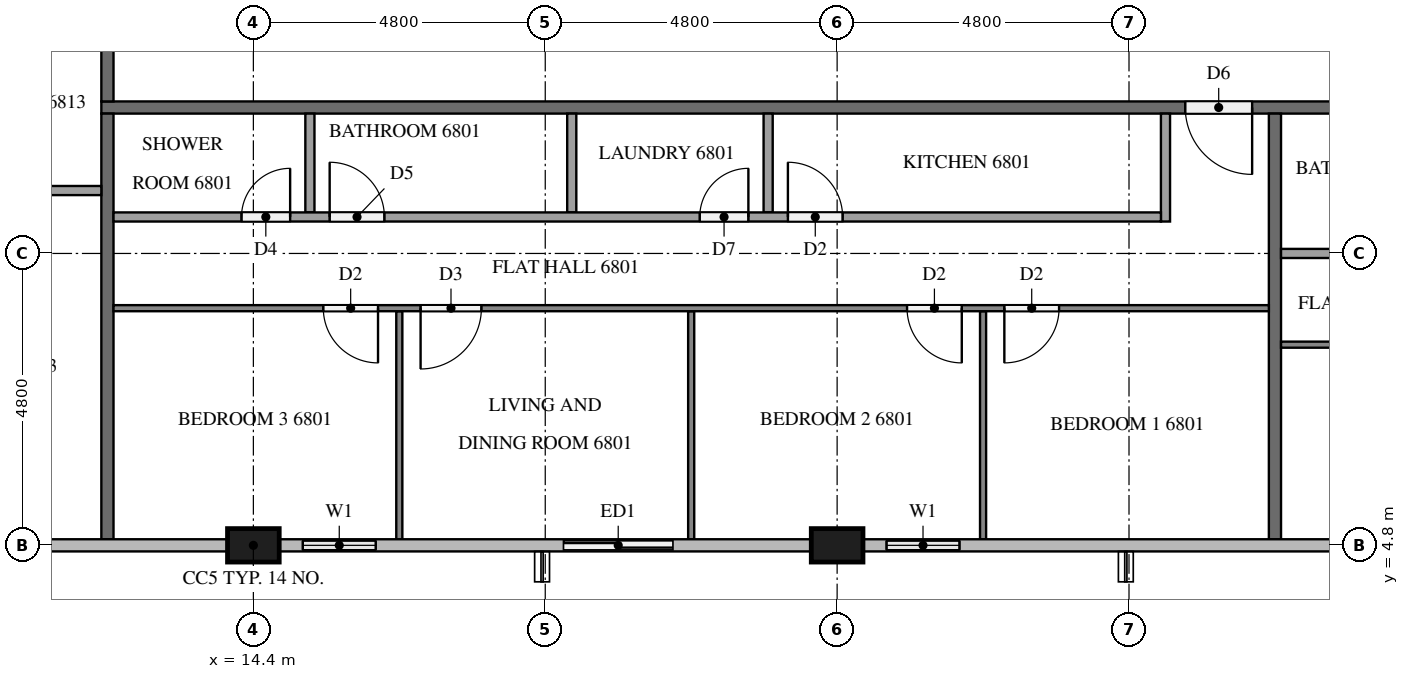
"""IFC4 building model, lengths in metres.
Left out: names, types, materials, properties, quantities, classifications, styles, units other than length and angle.
Written with IfcOpenShell. Run it as: python <this file> out.ifc"""

import sys

from ifc_helpers import new_model, si_unit, direction, frame, frame_2d, origin, origin_2d, place, context, subcontext, project, spatial, rectangle, extrude, element, fill, save


model = new_model("IFC4")
c1 = context("Model", 3, precision=1e-05, world=origin(), true_north=direction((0.0, 1.0)))
c2 = subcontext(c1, "Body", "Model", "MODEL_VIEW")
j1 = project(units=[si_unit("LENGTHUNIT", "METRE"), si_unit("PLANEANGLEUNIT", "RADIAN")], contexts=[c1])
p1 = place(None, origin())
s1 = spatial("IfcSite", under=j1, at=p1, CompositionType="ELEMENT")
p2 = place(p1, origin())
s2 = spatial("IfcBuilding", under=s1, at=p2, CompositionType="ELEMENT")
p3 = place(p2, frame((0.0, 0.0, 259.7)))
s3 = spatial("IfcBuildingStorey", under=s2, at=p3, CompositionType="ELEMENT", Elevation=259.7)
for number, where, z_axis, x_axis in (
    (1, (14.4, 4.8, 0.0), (0.0, 0.0, 1.0), (1.0, 0.0, 0.0)),
    (2, (24.0, 4.8, 0.0), (0.0, 0.0, 1.0), (1.0, 0.0, 0.0)),
):
    element("IfcColumn", number, at=place(p3, frame(where, z_axis=z_axis, x_axis=x_axis)), inside=s3, PredefinedType="COLUMN", context=c2, shape_type="SweptSolid", body=[
        extrude(rectangle(XDim=0.85, YDim=0.55, at=origin_2d()), origin(), (0.0, 0.0, 1.0), 3.1),
    ])
p4 = place(p3, frame((14.825, 4.8, 0.0), z_axis=(0.0, 0.0, 1.0), x_axis=(1.0, 0.0, 0.0)))
e3 = element("IfcWall", 3, at=p4, inside=s3, PredefinedType="SOLIDWALL", context=c2, shape_type="SweptSolid", body=[
    extrude(rectangle(XDim=1.975, YDim=0.15, at=frame_2d((0.988, 0.0))), origin(), (0.0, 0.0, 1.0), 3.1),
])
p5 = place(p4, frame((0.387, 0.0, 0.9)))
e4 = element("IfcOpeningElement", 4, at=p5, cuts=e3, PredefinedType="OPENING", context=c2, shape_type="SweptSolid", body=[
    extrude(rectangle(XDim=1.2, YDim=1.4, at=frame_2d((0.6, 0.7))), frame((0.0, 0.085, 0.0), z_axis=(0.0, -1.0, 0.0), x_axis=(1.0, 0.0, 0.0)), (0.0, 0.0, 1.0), 0.17),
])
p6 = place(p3, frame((19.2, 4.8, 0.0), z_axis=(0.0, 0.0, 1.0), x_axis=(1.0, 0.0, 0.0)))
e5 = element("IfcWall", 5, at=p6, inside=s3, PredefinedType="SOLIDWALL", context=c2, shape_type="SweptSolid", body=[
    extrude(rectangle(XDim=2.4, YDim=0.15, at=frame_2d((1.2, 0.0))), origin(), (0.0, 0.0, 1.0), 3.1),
])
p7 = place(p6, frame((0.3, 0.0, 0.0)))
e6 = element("IfcOpeningElement", 6, at=p7, cuts=e5, PredefinedType="OPENING", context=c2, shape_type="SweptSolid", body=[
    extrude(rectangle(XDim=1.8, YDim=2.4, at=frame_2d((0.9, 1.2))), frame((0.0, 0.085, 0.0), z_axis=(0.0, -1.0, 0.0), x_axis=(1.0, 0.0, 0.0)), (0.0, 0.0, 1.0), 0.17),
])
p8 = place(p3, frame((24.425, 4.8, 0.0), z_axis=(0.0, 0.0, 1.0), x_axis=(1.0, 0.0, 0.0)))
e7 = element("IfcWall", 7, at=p8, inside=s3, PredefinedType="SOLIDWALL", context=c2, shape_type="SweptSolid", body=[
    extrude(rectangle(XDim=1.975, YDim=0.15, at=frame_2d((0.987, 0.0))), origin(), (0.0, 0.0, 1.0), 3.1),
])
p9 = place(p8, frame((0.387, 0.0, 0.9)))
e8 = element("IfcOpeningElement", 8, at=p9, cuts=e7, PredefinedType="OPENING", context=c2, shape_type="SweptSolid", body=[
    extrude(rectangle(XDim=1.2, YDim=1.4, at=frame_2d((0.6, 0.7))), frame((0.0, 0.085, 0.0), z_axis=(0.0, -1.0, 0.0), x_axis=(1.0, 0.0, 0.0)), (0.0, 0.0, 1.0), 0.17),
])
p10 = place(p3, frame((50.5, 12.0, 0.0), z_axis=(0.0, 0.0, 1.0), x_axis=(-1.0, 0.0, 0.0)))
e9 = element("IfcWall", 9, at=p10, inside=s3, PredefinedType="PARTITIONING", context=c2, shape_type="SweptSolid", body=[
    extrude(rectangle(XDim=38.6, YDim=0.2, at=frame_2d((19.3, 0.0))), origin(), (0.0, 0.0, 1.0), 3.1),
])
p11 = place(p10, frame((19.675, 0.0, 0.0)))
e10 = element("IfcOpeningElement", 10, at=p11, cuts=e9, PredefinedType="OPENING", context=c2, shape_type="SweptSolid", body=[
    extrude(rectangle(XDim=1.1, YDim=2.1, at=frame_2d((0.55, 1.05))), frame((0.0, 0.11, 0.0), z_axis=(0.0, -1.0, 0.0), x_axis=(1.0, 0.0, 0.0)), (0.0, 0.0, 1.0), 0.22),
])
p12 = place(p10, frame((2.925, 0.0, 0.0)))
e11 = element("IfcOpeningElement", 11, at=p12, cuts=e9, PredefinedType="OPENING", context=c2, shape_type="SweptSolid", body=[
    extrude(rectangle(XDim=1.0, YDim=2.1, at=frame_2d((0.5, 1.05))), frame((0.0, 0.11, 0.0), z_axis=(0.0, -1.0, 0.0), x_axis=(1.0, 0.0, 0.0)), (0.0, 0.0, 1.0), 0.22),
])
p13 = place(p10, frame((1.075, 0.0, 0.0)))
e12 = element("IfcOpeningElement", 12, at=p13, cuts=e9, PredefinedType="OPENING", context=c2, shape_type="SweptSolid", body=[
    extrude(rectangle(XDim=1.0, YDim=2.1, at=frame_2d((0.5, 1.05))), frame((0.0, 0.11, 0.0), z_axis=(0.0, -1.0, 0.0), x_axis=(1.0, 0.0, 0.0)), (0.0, 0.0, 1.0), 0.22),
])
p14 = place(p3, frame((12.0, 12.1, 0.0), z_axis=(0.0, 0.0, 1.0), x_axis=(0.0, 1.0, 0.0)))
e13 = element("IfcWall", 13, at=p14, inside=s3, PredefinedType="PARTITIONING", context=c2, shape_type="SweptSolid", body=[
    extrude(rectangle(XDim=28.6, YDim=0.2, at=frame_2d((14.3, 0.0))), origin(), (0.0, 0.0, 1.0), 3.1),
])
p15 = place(p14, frame((21.875, 0.0, 0.0)))
e14 = element("IfcOpeningElement", 14, at=p15, cuts=e13, PredefinedType="OPENING", context=c2, shape_type="SweptSolid", body=[
    extrude(rectangle(XDim=1.1, YDim=2.1, at=frame_2d((0.55, 1.05))), frame((0.0, 0.11, 0.0), z_axis=(0.0, -1.0, 0.0), x_axis=(1.0, 0.0, 0.0)), (0.0, 0.0, 1.0), 0.22),
])
p16 = place(p14, frame((20.075, 0.0, 0.0)))
e15 = element("IfcOpeningElement", 15, at=p16, cuts=e13, PredefinedType="OPENING", context=c2, shape_type="SweptSolid", body=[
    extrude(rectangle(XDim=1.0, YDim=2.1, at=frame_2d((0.5, 1.05))), frame((0.0, 0.11, 0.0), z_axis=(0.0, -1.0, 0.0), x_axis=(1.0, 0.0, 0.0)), (0.0, 0.0, 1.0), 0.22),
])
p17 = place(p14, frame((5.675, 0.0, 0.0)))
e16 = element("IfcOpeningElement", 16, at=p17, cuts=e13, PredefinedType="OPENING", context=c2, shape_type="SweptSolid", body=[
    extrude(rectangle(XDim=1.0, YDim=2.1, at=frame_2d((0.5, 1.05))), frame((0.0, 0.11, 0.0), z_axis=(0.0, -1.0, 0.0), x_axis=(1.0, 0.0, 0.0)), (0.0, 0.0, 1.0), 0.22),
])
for number, where, z_axis, x_axis in (
    (17, (31.2, 11.9, 0.0), (0.0, 0.0, 1.0), (0.0, -1.0, 0.0)),
    (18, (12.0, 4.9, 0.0), (0.0, 0.0, 1.0), (0.0, 1.0, 0.0)),
):
    element("IfcWall", number, at=place(p3, frame(where, z_axis=z_axis, x_axis=x_axis)), inside=s3, PredefinedType="PARTITIONING", context=c2, shape_type="SweptSolid", body=[
        extrude(rectangle(XDim=7.0, YDim=0.2, at=frame_2d((3.5, 0.0))), origin(), (0.0, 0.0, 1.0), 3.1),
    ])
for number, where, z_axis, x_axis in (
    (19, (26.4, 8.65, 0.0), (0.0, 0.0, 1.0), (0.0, -1.0, 0.0)),
    (20, (21.6, 8.65, 0.0), (0.0, 0.0, 1.0), (0.0, -1.0, 0.0)),
    (21, (16.8, 8.65, 0.0), (0.0, 0.0, 1.0), (0.0, -1.0, 0.0)),
):
    element("IfcWall", number, at=place(p3, frame(where, z_axis=z_axis, x_axis=x_axis)), inside=s3, PredefinedType="PARTITIONING", context=c2, shape_type="SweptSolid", body=[
        extrude(rectangle(XDim=3.75, YDim=0.1, at=frame_2d((1.875, 0.0))), origin(), (0.0, 0.0, 1.0), 3.1),
    ])
p18 = place(p3, frame((31.1, 8.7, 0.0), z_axis=(0.0, 0.0, 1.0), x_axis=(-1.0, 0.0, 0.0)))
e22 = element("IfcWall", 22, at=p18, inside=s3, PredefinedType="PARTITIONING", context=c2, shape_type="SweptSolid", body=[
    extrude(rectangle(XDim=19.0, YDim=0.1, at=frame_2d((9.5, 0.0))), origin(), (0.0, 0.0, 1.0), 3.1),
])
p19 = place(p18, frame((3.45, 0.0, 0.0)))
e23 = element("IfcOpeningElement", 23, at=p19, cuts=e22, PredefinedType="OPENING", context=c2, shape_type="SweptSolid", body=[
    extrude(rectangle(XDim=0.9, YDim=2.1, at=frame_2d((0.45, 1.05))), frame((0.0, 0.06, 0.0), z_axis=(0.0, -1.0, 0.0), x_axis=(1.0, 0.0, 0.0)), (0.0, 0.0, 1.0), 0.12),
])
p20 = place(p18, frame((5.05, 0.0, 0.0)))
e24 = element("IfcOpeningElement", 24, at=p20, cuts=e22, PredefinedType="OPENING", context=c2, shape_type="SweptSolid", body=[
    extrude(rectangle(XDim=0.9, YDim=2.1, at=frame_2d((0.45, 1.05))), frame((0.0, 0.06, 0.0), z_axis=(0.0, -1.0, 0.0), x_axis=(1.0, 0.0, 0.0)), (0.0, 0.0, 1.0), 0.12),
])
p21 = place(p18, frame((12.95, 0.0, 0.0)))
e25 = element("IfcOpeningElement", 25, at=p21, cuts=e22, PredefinedType="OPENING", context=c2, shape_type="SweptSolid", body=[
    extrude(rectangle(XDim=1.0, YDim=2.1, at=frame_2d((0.5, 1.05))), frame((0.0, 0.06, 0.0), z_axis=(0.0, -1.0, 0.0), x_axis=(1.0, 0.0, 0.0)), (0.0, 0.0, 1.0), 0.12),
])
p22 = place(p18, frame((14.65, 0.0, 0.0)))
e26 = element("IfcOpeningElement", 26, at=p22, cuts=e22, PredefinedType="OPENING", context=c2, shape_type="SweptSolid", body=[
    extrude(rectangle(XDim=0.9, YDim=2.1, at=frame_2d((0.45, 1.05))), frame((0.0, 0.06, 0.0), z_axis=(0.0, -1.0, 0.0), x_axis=(1.0, 0.0, 0.0)), (0.0, 0.0, 1.0), 0.12),
])
for number, where, z_axis, x_axis in (
    (27, (22.865, 11.9, 0.0), (0.0, 0.0, 1.0), (0.0, -1.0, 0.0)),
    (28, (19.636, 11.9, 0.0), (0.0, 0.0, 1.0), (0.0, -1.0, 0.0)),
    (29, (15.33, 11.9, 0.0), (0.0, 0.0, 1.0), (0.0, -1.0, 0.0)),
):
    element("IfcWall", number, at=place(p3, frame(where, z_axis=z_axis, x_axis=x_axis)), inside=s3, PredefinedType="PARTITIONING", context=c2, shape_type="SweptSolid", body=[
        extrude(rectangle(XDim=1.625, YDim=0.15, at=frame_2d((0.812, 0.0))), origin(), (0.0, 0.0, 1.0), 3.1),
    ])
p23 = place(p3, frame((29.4, 11.9, 0.0), z_axis=(0.0, 0.0, 1.0), x_axis=(0.0, -1.0, 0.0)))
e30 = element("IfcWall", 30, at=p23, inside=s3, PredefinedType="PARTITIONING", context=c2, shape_type="SweptSolid", body=[
    extrude(rectangle(XDim=1.775, YDim=0.15, at=frame_2d((0.887, 0.0))), origin(), (0.0, 0.0, 1.0), 3.1),
])
p24 = place(p3, frame((12.1, 10.2, 0.0), z_axis=(0.0, 0.0, 1.0), x_axis=(1.0, 0.0, 0.0)))
e31 = element("IfcWall", 31, at=p24, inside=s3, PredefinedType="PARTITIONING", context=c2, shape_type="SweptSolid", body=[
    extrude(rectangle(XDim=17.225, YDim=0.15, at=frame_2d((8.612, 0.0))), origin(), (0.0, 0.0, 1.0), 3.1),
])
p25 = place(p24, frame((11.091, 0.0, 0.0)))
e32 = element("IfcOpeningElement", 32, at=p25, cuts=e31, PredefinedType="OPENING", context=c2, shape_type="SweptSolid", body=[
    extrude(rectangle(XDim=0.9, YDim=2.1, at=frame_2d((0.45, 1.05))), frame((0.0, 0.085, 0.0), z_axis=(0.0, -1.0, 0.0), x_axis=(1.0, 0.0, 0.0)), (0.0, 0.0, 1.0), 0.17),
])
p26 = place(p24, frame((9.641, 0.0, 0.0)))
e33 = element("IfcOpeningElement", 33, at=p26, cuts=e31, PredefinedType="OPENING", context=c2, shape_type="SweptSolid", body=[
    extrude(rectangle(XDim=0.8, YDim=2.1, at=frame_2d((0.4, 1.05))), frame((0.0, 0.085, 0.0), z_axis=(0.0, -1.0, 0.0), x_axis=(1.0, 0.0, 0.0)), (0.0, 0.0, 1.0), 0.17),
])
p27 = place(p24, frame((3.555, 0.0, 0.0)))
e34 = element("IfcOpeningElement", 34, at=p27, cuts=e31, PredefinedType="OPENING", context=c2, shape_type="SweptSolid", body=[
    extrude(rectangle(XDim=0.9, YDim=2.1, at=frame_2d((0.45, 1.05))), frame((0.0, 0.085, 0.0), z_axis=(0.0, -1.0, 0.0), x_axis=(1.0, 0.0, 0.0)), (0.0, 0.0, 1.0), 0.17),
])
p28 = place(p24, frame((2.105, 0.0, 0.0)))
e35 = element("IfcOpeningElement", 35, at=p28, cuts=e31, PredefinedType="OPENING", context=c2, shape_type="SweptSolid", body=[
    extrude(rectangle(XDim=0.8, YDim=2.1, at=frame_2d((0.4, 1.05))), frame((0.0, 0.085, 0.0), z_axis=(0.0, -1.0, 0.0), x_axis=(1.0, 0.0, 0.0)), (0.0, 0.0, 1.0), 0.17),
])
p29 = place(p3, frame((47.9, 8.1, 0.0), z_axis=(0.0, 0.0, 1.0), x_axis=(-1.0, 0.0, 0.0)))
e36 = element("IfcWall", 36, at=p29, inside=s3, PredefinedType="PARTITIONING", context=c2, shape_type="SweptSolid", body=[
    extrude(rectangle(XDim=16.6, YDim=0.1, at=frame_2d((8.3, 0.0))), origin(), (0.0, 0.0, 1.0), 3.1),
])
p30 = place(p29, frame((0.3, 0.0, 0.0)))
e37 = element("IfcOpeningElement", 37, at=p30, cuts=e36, PredefinedType="OPENING", context=c2, shape_type="SweptSolid", body=[
    extrude(rectangle(XDim=0.9, YDim=2.1, at=frame_2d((0.45, 1.05))), frame((0.0, 0.06, 0.0), z_axis=(0.0, -1.0, 0.0), x_axis=(1.0, 0.0, 0.0)), (0.0, 0.0, 1.0), 0.12),
])
p31 = place(p29, frame((10.55, 0.0, 0.0)))
e38 = element("IfcOpeningElement", 38, at=p31, cuts=e36, PredefinedType="OPENING", context=c2, shape_type="SweptSolid", body=[
    extrude(rectangle(XDim=1.0, YDim=2.1, at=frame_2d((0.5, 1.05))), frame((0.0, 0.06, 0.0), z_axis=(0.0, -1.0, 0.0), x_axis=(1.0, 0.0, 0.0)), (0.0, 0.0, 1.0), 0.12),
])
p32 = place(p29, frame((12.25, 0.0, 0.0)))
e39 = element("IfcOpeningElement", 39, at=p32, cuts=e36, PredefinedType="OPENING", context=c2, shape_type="SweptSolid", body=[
    extrude(rectangle(XDim=0.9, YDim=2.1, at=frame_2d((0.45, 1.05))), frame((0.0, 0.06, 0.0), z_axis=(0.0, -1.0, 0.0), x_axis=(1.0, 0.0, 0.0)), (0.0, 0.0, 1.0), 0.12),
])
p33 = place(p3, frame((31.3, 9.6, 0.0), z_axis=(0.0, 0.0, 1.0), x_axis=(1.0, 0.0, 0.0)))
e40 = element("IfcWall", 40, at=p33, inside=s3, PredefinedType="PARTITIONING", context=c2, shape_type="SweptSolid", body=[
    extrude(rectangle(XDim=14.825, YDim=0.15, at=frame_2d((7.413, 0.0))), origin(), (0.0, 0.0, 1.0), 3.1),
])
p34 = place(p33, frame((13.625, 0.0, 0.0)))
e41 = element("IfcOpeningElement", 41, at=p34, cuts=e40, PredefinedType="OPENING", context=c2, shape_type="SweptSolid", body=[
    extrude(rectangle(XDim=0.9, YDim=2.1, at=frame_2d((0.45, 1.05))), frame((0.0, 0.085, 0.0), z_axis=(0.0, -1.0, 0.0), x_axis=(1.0, 0.0, 0.0)), (0.0, 0.0, 1.0), 0.17),
])
p35 = place(p33, frame((4.886, 0.0, 0.0)))
e42 = element("IfcOpeningElement", 42, at=p35, cuts=e40, PredefinedType="OPENING", context=c2, shape_type="SweptSolid", body=[
    extrude(rectangle(XDim=0.8, YDim=2.1, at=frame_2d((0.4, 1.05))), frame((0.0, 0.085, 0.0), z_axis=(0.0, -1.0, 0.0), x_axis=(1.0, 0.0, 0.0)), (0.0, 0.0, 1.0), 0.17),
])
p36 = place(p33, frame((3.336, 0.0, 0.0)))
e43 = element("IfcOpeningElement", 43, at=p36, cuts=e40, PredefinedType="OPENING", context=c2, shape_type="SweptSolid", body=[
    extrude(rectangle(XDim=0.9, YDim=2.1, at=frame_2d((0.45, 1.05))), frame((0.0, 0.085, 0.0), z_axis=(0.0, -1.0, 0.0), x_axis=(1.0, 0.0, 0.0)), (0.0, 0.0, 1.0), 0.17),
])
p37 = place(p3, frame((11.9, 10.635, 0.0), z_axis=(0.0, 0.0, 1.0), x_axis=(-1.0, 0.0, 0.0)))
e44 = element("IfcWall", 44, at=p37, inside=s3, PredefinedType="PARTITIONING", context=c2, shape_type="SweptSolid", body=[
    extrude(rectangle(XDim=3.575, YDim=0.15, at=frame_2d((1.788, 0.0))), origin(), (0.0, 0.0, 1.0), 3.1),
])
p38 = place(p5, origin())
e45 = element("IfcWindow", 45, at=p38, inside=s3, PartitioningType="SINGLE_PANEL", PredefinedType="WINDOW", context=c2, shape_type="SweptSolid", body=[
    extrude(rectangle(XDim=1.2, YDim=1.4, at=frame_2d((0.6, 0.7))), frame((0.0, 0.03, 0.0), z_axis=(0.0, -1.0, 0.0), x_axis=(1.0, 0.0, 0.0)), (0.0, 0.0, 1.0), 0.06),
])
fill(e4, e45)
p39 = place(p7, origin())
e46 = element("IfcDoor", 46, at=p39, inside=s3, OperationType="SLIDING_TO_LEFT", PredefinedType="DOOR", context=c2, shape_type="SweptSolid", body=[
    extrude(rectangle(XDim=1.8, YDim=2.4, at=frame_2d((0.9, 1.2))), frame((0.0, 0.025, 0.0), z_axis=(0.0, -1.0, 0.0), x_axis=(1.0, 0.0, 0.0)), (0.0, 0.0, 1.0), 0.05),
])
fill(e6, e46)
p40 = place(p9, origin())
e47 = element("IfcWindow", 47, at=p40, inside=s3, PartitioningType="SINGLE_PANEL", PredefinedType="WINDOW", context=c2, shape_type="SweptSolid", body=[
    extrude(rectangle(XDim=1.2, YDim=1.4, at=frame_2d((0.6, 0.7))), frame((0.0, 0.03, 0.0), z_axis=(0.0, -1.0, 0.0), x_axis=(1.0, 0.0, 0.0)), (0.0, 0.0, 1.0), 0.06),
])
fill(e8, e47)
p41 = place(p11, origin())
e48 = element("IfcDoor", 48, at=p41, inside=s3, OperationType="SINGLE_SWING_LEFT", PredefinedType="DOOR", context=c2, shape_type="SweptSolid", body=[
    extrude(rectangle(XDim=1.1, YDim=2.1, at=frame_2d((0.55, 1.05))), frame((0.0, 0.025, 0.0), z_axis=(0.0, -1.0, 0.0), x_axis=(1.0, 0.0, 0.0)), (0.0, 0.0, 1.0), 0.05),
])
fill(e10, e48)
p42 = place(p19, origin())
e49 = element("IfcDoor", 49, at=p42, inside=s3, OperationType="SINGLE_SWING_RIGHT", PredefinedType="DOOR", context=c2, shape_type="SweptSolid", body=[
    extrude(rectangle(XDim=0.9, YDim=2.1, at=frame_2d((0.45, 1.05))), frame((0.0, 0.025, 0.0), z_axis=(0.0, -1.0, 0.0), x_axis=(1.0, 0.0, 0.0)), (0.0, 0.0, 1.0), 0.05),
])
fill(e23, e49)
p43 = place(p20, origin())
e50 = element("IfcDoor", 50, at=p43, inside=s3, OperationType="SINGLE_SWING_LEFT", PredefinedType="DOOR", context=c2, shape_type="SweptSolid", body=[
    extrude(rectangle(XDim=0.9, YDim=2.1, at=frame_2d((0.45, 1.05))), frame((0.0, 0.025, 0.0), z_axis=(0.0, -1.0, 0.0), x_axis=(1.0, 0.0, 0.0)), (0.0, 0.0, 1.0), 0.05),
])
fill(e24, e50)
p44 = place(p21, origin())
e51 = element("IfcDoor", 51, at=p44, inside=s3, OperationType="SINGLE_SWING_RIGHT", PredefinedType="DOOR", context=c2, shape_type="SweptSolid", body=[
    extrude(rectangle(XDim=1.0, YDim=2.1, at=frame_2d((0.5, 1.05))), frame((0.0, 0.025, 0.0), z_axis=(0.0, -1.0, 0.0), x_axis=(1.0, 0.0, 0.0)), (0.0, 0.0, 1.0), 0.05),
])
fill(e25, e51)
p45 = place(p22, origin())
e52 = element("IfcDoor", 52, at=p45, inside=s3, OperationType="SINGLE_SWING_LEFT", PredefinedType="DOOR", context=c2, shape_type="SweptSolid", body=[
    extrude(rectangle(XDim=0.9, YDim=2.1, at=frame_2d((0.45, 1.05))), frame((0.0, 0.025, 0.0), z_axis=(0.0, -1.0, 0.0), x_axis=(1.0, 0.0, 0.0)), (0.0, 0.0, 1.0), 0.05),
])
fill(e26, e52)
p46 = place(p25, origin())
e53 = element("IfcDoor", 53, at=p46, inside=s3, OperationType="SINGLE_SWING_LEFT", PredefinedType="DOOR", context=c2, shape_type="SweptSolid", body=[
    extrude(rectangle(XDim=0.9, YDim=2.1, at=frame_2d((0.45, 1.05))), frame((0.0, 0.025, 0.0), z_axis=(0.0, -1.0, 0.0), x_axis=(1.0, 0.0, 0.0)), (0.0, 0.0, 1.0), 0.05),
])
fill(e32, e53)
p47 = place(p26, origin())
e54 = element("IfcDoor", 54, at=p47, inside=s3, OperationType="SINGLE_SWING_RIGHT", PredefinedType="DOOR", context=c2, shape_type="SweptSolid", body=[
    extrude(rectangle(XDim=0.8, YDim=2.1, at=frame_2d((0.4, 1.05))), frame((0.0, 0.025, 0.0), z_axis=(0.0, -1.0, 0.0), x_axis=(1.0, 0.0, 0.0)), (0.0, 0.0, 1.0), 0.05),
])
fill(e33, e54)
p48 = place(p27, origin())
e55 = element("IfcDoor", 55, at=p48, inside=s3, OperationType="SINGLE_SWING_LEFT", PredefinedType="DOOR", context=c2, shape_type="SweptSolid", body=[
    extrude(rectangle(XDim=0.9, YDim=2.1, at=frame_2d((0.45, 1.05))), frame((0.0, 0.025, 0.0), z_axis=(0.0, -1.0, 0.0), x_axis=(1.0, 0.0, 0.0)), (0.0, 0.0, 1.0), 0.05),
])
fill(e34, e55)
p49 = place(p28, origin())
e56 = element("IfcDoor", 56, at=p49, inside=s3, OperationType="SINGLE_SWING_RIGHT", PredefinedType="DOOR", context=c2, shape_type="SweptSolid", body=[
    extrude(rectangle(XDim=0.8, YDim=2.1, at=frame_2d((0.4, 1.05))), frame((0.0, 0.025, 0.0), z_axis=(0.0, -1.0, 0.0), x_axis=(1.0, 0.0, 0.0)), (0.0, 0.0, 1.0), 0.05),
])
fill(e35, e56)
save(model, sys.argv[1])
